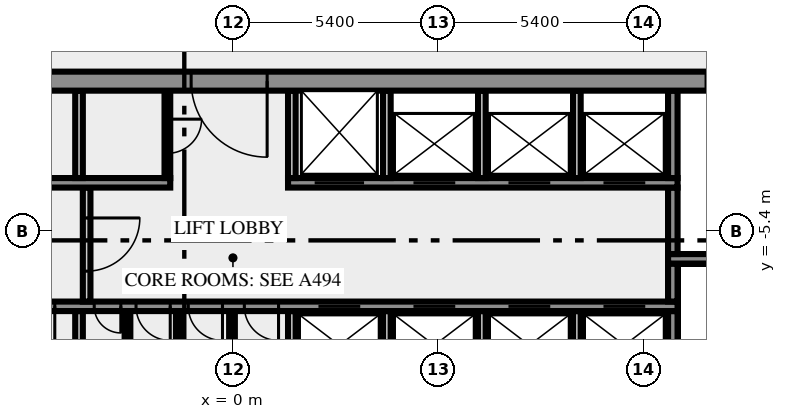
"""IFC4 building model, lengths in metres.
Left out: names, types, materials, properties, quantities, classifications, styles, units other than length and angle.
Written with IfcOpenShell. Run it as: python <this file> out.ifc"""

import sys

from ifc_helpers import new_model, si_unit, direction, frame, frame_2d, origin, place, context, subcontext, project, spatial, rectangle, extrude, element, fill, save


model = new_model("IFC4")
c1 = context("Model", 3, precision=1e-05, world=origin(), true_north=direction((0.0, 1.0)))
c2 = subcontext(c1, "Body", "Model", "MODEL_VIEW")
j1 = project(units=[si_unit("LENGTHUNIT", "METRE"), si_unit("PLANEANGLEUNIT", "RADIAN")], contexts=[c1])
p1 = place(None, origin())
s1 = spatial("IfcSite", under=j1, at=p1, CompositionType="ELEMENT")
p2 = place(p1, origin())
s2 = spatial("IfcBuilding", under=s1, at=p2, CompositionType="ELEMENT")
p3 = place(p2, frame((0.0, 0.0, 210.0)))
s3 = spatial("IfcBuildingStorey", under=s2, at=p3, CompositionType="ELEMENT", Elevation=210.0)
p4 = place(p3, frame((-4.05, -10.5, 0.0), z_axis=(0.0, 0.0, 1.0), x_axis=(0.0, 1.0, 0.0)))
e1 = element("IfcWall", 1, at=p4, inside=s3, PredefinedType="SOLIDWALL", context=c2, shape_type="SweptSolid", body=[
    extrude(rectangle(XDim=3.0, YDim=0.2, at=frame_2d((1.5, 0.0))), origin(), (0.0, 0.0, 1.0), 3.65),
])
for number, where, z_axis, x_axis in (
    (2, (-2.775, -10.5, 0.0), (0.0, 0.0, 1.0), (0.0, 1.0, 0.0)),
    (3, (-1.425, -10.5, 0.0), (0.0, 0.0, 1.0), (0.0, 1.0, 0.0)),
    (4, (-0.025, -10.5, 0.0), (0.0, 0.0, 1.0), (0.0, 1.0, 0.0)),
):
    element("IfcWall", number, at=place(p3, frame(where, z_axis=z_axis, x_axis=x_axis)), inside=s3, PredefinedType="PARTITIONING", context=c2, shape_type="SweptSolid", body=[
        extrude(rectangle(XDim=3.0, YDim=0.15, at=frame_2d((1.5, 0.0))), origin(), (0.0, 0.0, 1.0), 3.65),
    ])
for number, where, z_axis, x_axis in (
    (5, (1.55, -10.5, 0.0), (0.0, 0.0, 1.0), (0.0, 1.0, 0.0)),
    (6, (4.05, -10.5, 0.0), (0.0, 0.0, 1.0), (0.0, 1.0, 0.0)),
    (7, (6.55, -10.5, 0.0), (0.0, 0.0, 1.0), (0.0, 1.0, 0.0)),
    (8, (9.05, -10.5, 0.0), (0.0, 0.0, 1.0), (0.0, 1.0, 0.0)),
):
    element("IfcWall", number, at=place(p3, frame(where, z_axis=z_axis, x_axis=x_axis)), inside=s3, PredefinedType="SOLIDWALL", context=c2, shape_type="SweptSolid", body=[
        extrude(rectangle(XDim=3.0, YDim=0.2, at=frame_2d((1.5, 0.0))), origin(), (0.0, 0.0, 1.0), 3.65),
    ])
p5 = place(p3, frame((11.575, -10.5, 0.0), z_axis=(0.0, 0.0, 1.0), x_axis=(0.0, 1.0, 0.0)))
e9 = element("IfcWall", 9, at=p5, inside=s3, PredefinedType="SHEAR", context=c2, shape_type="SweptSolid", body=[
    extrude(rectangle(XDim=3.0, YDim=0.25, at=frame_2d((1.5, 0.0))), origin(), (0.0, 0.0, 1.0), 3.65),
])
p6 = place(p3, frame((11.7, -7.375, 0.0), z_axis=(0.0, 0.0, 1.0), x_axis=(-1.0, 0.0, 0.0)))
e10 = element("IfcWall", 10, at=p6, inside=s3, PredefinedType="SHEAR", context=c2, shape_type="SweptSolid", body=[
    extrude(rectangle(XDim=23.4, YDim=0.25, at=frame_2d((11.7, 0.0))), origin(), (0.0, 0.0, 1.0), 3.65),
])
p7 = place(p6, frame((21.312, 0.0, 0.0)))
e11 = element("IfcOpeningElement", 11, at=p7, cuts=e10, PredefinedType="OPENING", context=c2, shape_type="SweptSolid", body=[
    extrude(rectangle(XDim=0.9, YDim=2.1, at=frame_2d((0.45, 1.05))), frame((0.0, 0.135, 0.0), z_axis=(0.0, -1.0, 0.0), x_axis=(1.0, 0.0, 0.0)), (0.0, 0.0, 1.0), 0.27),
])
p8 = place(p6, frame((18.65, 0.0, 0.0)))
e12 = element("IfcOpeningElement", 12, at=p8, cuts=e10, PredefinedType="OPENING", context=c2, shape_type="SweptSolid", body=[
    extrude(rectangle(XDim=0.9, YDim=2.1, at=frame_2d((0.45, 1.05))), frame((0.0, 0.135, 0.0), z_axis=(0.0, -1.0, 0.0), x_axis=(1.0, 0.0, 0.0)), (0.0, 0.0, 1.0), 0.27),
])
p9 = place(p6, frame((16.388, 0.0, 0.0)))
e13 = element("IfcOpeningElement", 13, at=p9, cuts=e10, PredefinedType="OPENING", context=c2, shape_type="SweptSolid", body=[
    extrude(rectangle(XDim=0.9, YDim=2.1, at=frame_2d((0.45, 1.05))), frame((0.0, 0.135, 0.0), z_axis=(0.0, -1.0, 0.0), x_axis=(1.0, 0.0, 0.0)), (0.0, 0.0, 1.0), 0.27),
])
p10 = place(p6, frame((14.65, 0.0, 0.0)))
e14 = element("IfcOpeningElement", 14, at=p10, cuts=e10, PredefinedType="OPENING", context=c2, shape_type="SweptSolid", body=[
    extrude(rectangle(XDim=0.7, YDim=2.1, at=frame_2d((0.35, 1.05))), frame((0.0, 0.135, 0.0), z_axis=(0.0, -1.0, 0.0), x_axis=(1.0, 0.0, 0.0)), (0.0, 0.0, 1.0), 0.27),
])
p11 = place(p6, frame((13.35, 0.0, 0.0)))
e15 = element("IfcOpeningElement", 15, at=p11, cuts=e10, PredefinedType="OPENING", context=c2, shape_type="SweptSolid", body=[
    extrude(rectangle(XDim=0.9, YDim=2.1, at=frame_2d((0.45, 1.05))), frame((0.0, 0.135, 0.0), z_axis=(0.0, -1.0, 0.0), x_axis=(1.0, 0.0, 0.0)), (0.0, 0.0, 1.0), 0.27),
])
p12 = place(p6, frame((11.975, 0.0, 0.0)))
e16 = element("IfcOpeningElement", 16, at=p12, cuts=e10, PredefinedType="OPENING", context=c2, shape_type="SweptSolid", body=[
    extrude(rectangle(XDim=0.9, YDim=2.1, at=frame_2d((0.45, 1.05))), frame((0.0, 0.135, 0.0), z_axis=(0.0, -1.0, 0.0), x_axis=(1.0, 0.0, 0.0)), (0.0, 0.0, 1.0), 0.27),
])
p13 = place(p6, frame((10.5, 0.0, 0.0)))
e17 = element("IfcOpeningElement", 17, at=p13, cuts=e10, PredefinedType="OPENING", context=c2, shape_type="SweptSolid", body=[
    extrude(rectangle(XDim=0.9, YDim=2.1, at=frame_2d((0.45, 1.05))), frame((0.0, 0.135, 0.0), z_axis=(0.0, -1.0, 0.0), x_axis=(1.0, 0.0, 0.0)), (0.0, 0.0, 1.0), 0.27),
])
p14 = place(p6, frame((8.35, 0.0, 0.0)))
e18 = element("IfcOpeningElement", 18, at=p14, cuts=e10, PredefinedType="OPENING", context=c2, shape_type="SweptSolid", body=[
    extrude(rectangle(XDim=1.1, YDim=2.1, at=frame_2d((0.55, 1.05))), frame((0.0, 0.135, 0.0), z_axis=(0.0, -1.0, 0.0), x_axis=(1.0, 0.0, 0.0)), (0.0, 0.0, 1.0), 0.27),
])
p15 = place(p6, frame((5.85, 0.0, 0.0)))
e19 = element("IfcOpeningElement", 19, at=p15, cuts=e10, PredefinedType="OPENING", context=c2, shape_type="SweptSolid", body=[
    extrude(rectangle(XDim=1.1, YDim=2.1, at=frame_2d((0.55, 1.05))), frame((0.0, 0.135, 0.0), z_axis=(0.0, -1.0, 0.0), x_axis=(1.0, 0.0, 0.0)), (0.0, 0.0, 1.0), 0.27),
])
p16 = place(p6, frame((3.35, 0.0, 0.0)))
e20 = element("IfcOpeningElement", 20, at=p16, cuts=e10, PredefinedType="OPENING", context=c2, shape_type="SweptSolid", body=[
    extrude(rectangle(XDim=1.1, YDim=2.1, at=frame_2d((0.55, 1.05))), frame((0.0, 0.135, 0.0), z_axis=(0.0, -1.0, 0.0), x_axis=(1.0, 0.0, 0.0)), (0.0, 0.0, 1.0), 0.27),
])
p17 = place(p6, frame((0.85, 0.0, 0.0)))
e21 = element("IfcOpeningElement", 21, at=p17, cuts=e10, PredefinedType="OPENING", context=c2, shape_type="SweptSolid", body=[
    extrude(rectangle(XDim=1.1, YDim=2.1, at=frame_2d((0.55, 1.05))), frame((0.0, 0.135, 0.0), z_axis=(0.0, -1.0, 0.0), x_axis=(1.0, 0.0, 0.0)), (0.0, 0.0, 1.0), 0.27),
])
p18 = place(p3, frame((-3.85, -4.25, 0.0), z_axis=(0.0, 0.0, 1.0), x_axis=(0.0, -1.0, 0.0)))
e22 = element("IfcWall", 22, at=p18, inside=s3, PredefinedType="SOLIDWALL", context=c2, shape_type="SweptSolid", body=[
    extrude(rectangle(XDim=3.0, YDim=0.2, at=frame_2d((1.5, 0.0))), origin(), (0.0, 0.0, 1.0), 3.65),
])
p19 = place(p18, frame((0.8, 0.0, 0.0)))
e23 = element("IfcOpeningElement", 23, at=p19, cuts=e22, PredefinedType="OPENING", context=c2, shape_type="SweptSolid", body=[
    extrude(rectangle(XDim=1.4, YDim=2.1, at=frame_2d((0.7, 1.05))), frame((0.0, 0.11, 0.0), z_axis=(0.0, -1.0, 0.0), x_axis=(1.0, 0.0, 0.0)), (0.0, 0.0, 1.0), 0.22),
])
p20 = place(p3, frame((11.575, -7.25, 0.0), z_axis=(0.0, 0.0, 1.0), x_axis=(0.0, 1.0, 0.0)))
e24 = element("IfcWall", 24, at=p20, inside=s3, PredefinedType="SHEAR", context=c2, shape_type="SweptSolid", body=[
    extrude(rectangle(XDim=1.0, YDim=0.25, at=frame_2d((0.5, 0.0))), origin(), (0.0, 0.0, 1.0), 3.65),
])
p21 = place(p3, frame((19.5, -6.125, 0.0), z_axis=(0.0, 0.0, 1.0), x_axis=(-1.0, 0.0, 0.0)))
e25 = element("IfcWall", 25, at=p21, inside=s3, PredefinedType="SHEAR", context=c2, shape_type="SweptSolid", body=[
    extrude(rectangle(XDim=8.05, YDim=0.25, at=frame_2d((4.025, 0.0))), origin(), (0.0, 0.0, 1.0), 3.65),
])
p22 = place(p21, frame((0.05, 0.0, 0.0)))
e26 = element("IfcOpeningElement", 26, at=p22, cuts=e25, PredefinedType="OPENING", context=c2, shape_type="SweptSolid", body=[
    extrude(rectangle(XDim=1.8, YDim=2.1, at=frame_2d((0.9, 1.05))), frame((0.0, 0.135, 0.0), z_axis=(0.0, -1.0, 0.0), x_axis=(1.0, 0.0, 0.0)), (0.0, 0.0, 1.0), 0.27),
])
p23 = place(p3, frame((11.575, -6.0, 0.0), z_axis=(0.0, 0.0, 1.0), x_axis=(0.0, 1.0, 0.0)))
e27 = element("IfcWall", 27, at=p23, inside=s3, PredefinedType="SHEAR", context=c2, shape_type="SweptSolid", body=[
    extrude(rectangle(XDim=1.75, YDim=0.25, at=frame_2d((0.875, 0.0))), origin(), (0.0, 0.0, 1.0), 3.65),
])
p24 = place(p3, frame((-11.7, -4.125, 0.0), z_axis=(0.0, 0.0, 1.0), x_axis=(1.0, 0.0, 0.0)))
e28 = element("IfcWall", 28, at=p24, inside=s3, PredefinedType="SHEAR", context=c2, shape_type="SweptSolid", body=[
    extrude(rectangle(XDim=10.05, YDim=0.25, at=frame_2d((5.025, 0.0))), origin(), (0.0, 0.0, 1.0), 3.65),
])
p25 = place(p3, frame((1.45, -4.125, 0.0), z_axis=(0.0, 0.0, 1.0), x_axis=(1.0, 0.0, 0.0)))
e29 = element("IfcWall", 29, at=p25, inside=s3, PredefinedType="SHEAR", context=c2, shape_type="SweptSolid", body=[
    extrude(rectangle(XDim=10.25, YDim=0.25, at=frame_2d((5.125, 0.0))), origin(), (0.0, 0.0, 1.0), 3.65),
])
p26 = place(p25, frame((0.7, 0.0, 0.0)))
e30 = element("IfcOpeningElement", 30, at=p26, cuts=e29, PredefinedType="OPENING", context=c2, shape_type="SweptSolid", body=[
    extrude(rectangle(XDim=1.3, YDim=2.1, at=frame_2d((0.65, 1.05))), frame((0.0, 0.135, 0.0), z_axis=(0.0, -1.0, 0.0), x_axis=(1.0, 0.0, 0.0)), (0.0, 0.0, 1.0), 0.27),
])
p27 = place(p25, frame((3.3, 0.0, 0.0)))
e31 = element("IfcOpeningElement", 31, at=p27, cuts=e29, PredefinedType="OPENING", context=c2, shape_type="SweptSolid", body=[
    extrude(rectangle(XDim=1.1, YDim=2.1, at=frame_2d((0.55, 1.05))), frame((0.0, 0.135, 0.0), z_axis=(0.0, -1.0, 0.0), x_axis=(1.0, 0.0, 0.0)), (0.0, 0.0, 1.0), 0.27),
])
p28 = place(p25, frame((5.8, 0.0, 0.0)))
e32 = element("IfcOpeningElement", 32, at=p28, cuts=e29, PredefinedType="OPENING", context=c2, shape_type="SweptSolid", body=[
    extrude(rectangle(XDim=1.1, YDim=2.1, at=frame_2d((0.55, 1.05))), frame((0.0, 0.135, 0.0), z_axis=(0.0, -1.0, 0.0), x_axis=(1.0, 0.0, 0.0)), (0.0, 0.0, 1.0), 0.27),
])
p29 = place(p25, frame((8.3, 0.0, 0.0)))
e33 = element("IfcOpeningElement", 33, at=p29, cuts=e29, PredefinedType="OPENING", context=c2, shape_type="SweptSolid", body=[
    extrude(rectangle(XDim=1.1, YDim=2.1, at=frame_2d((0.55, 1.05))), frame((0.0, 0.135, 0.0), z_axis=(0.0, -1.0, 0.0), x_axis=(1.0, 0.0, 0.0)), (0.0, 0.0, 1.0), 0.27),
])
p30 = place(p3, frame((-4.05, -4.0, 0.0), z_axis=(0.0, 0.0, 1.0), x_axis=(0.0, 1.0, 0.0)))
e34 = element("IfcWall", 34, at=p30, inside=s3, PredefinedType="SOLIDWALL", context=c2, shape_type="SweptSolid", body=[
    extrude(rectangle(XDim=2.3, YDim=0.2, at=frame_2d((1.15, 0.0))), origin(), (0.0, 0.0, 1.0), 3.65),
])
p31 = place(p3, frame((-1.725, -1.7, 0.0), z_axis=(0.0, 0.0, 1.0), x_axis=(0.0, -1.0, 0.0)))
e35 = element("IfcWall", 35, at=p31, inside=s3, PredefinedType="PARTITIONING", context=c2, shape_type="SweptSolid", body=[
    extrude(rectangle(XDim=2.3, YDim=0.15, at=frame_2d((1.15, 0.0))), origin(), (0.0, 0.0, 1.0), 3.65),
])
p32 = place(p31, frame((0.75, 0.0, 0.0)))
e36 = element("IfcOpeningElement", 36, at=p32, cuts=e35, PredefinedType="OPENING", context=c2, shape_type="SweptSolid", body=[
    extrude(rectangle(XDim=0.9, YDim=2.1, at=frame_2d((0.45, 1.05))), frame((0.0, 0.085, 0.0), z_axis=(0.0, -1.0, 0.0), x_axis=(1.0, 0.0, 0.0)), (0.0, 0.0, 1.0), 0.17),
])
for number, where, z_axis, x_axis in (
    (37, (1.55, -4.0, 0.0), (0.0, 0.0, 1.0), (0.0, 1.0, 0.0)),
    (38, (4.05, -4.0, 0.0), (0.0, 0.0, 1.0), (0.0, 1.0, 0.0)),
    (39, (6.55, -4.0, 0.0), (0.0, 0.0, 1.0), (0.0, 1.0, 0.0)),
    (40, (9.05, -4.0, 0.0), (0.0, 0.0, 1.0), (0.0, 1.0, 0.0)),
):
    element("IfcWall", number, at=place(p3, frame(where, z_axis=z_axis, x_axis=x_axis)), inside=s3, PredefinedType="SOLIDWALL", context=c2, shape_type="SweptSolid", body=[
        extrude(rectangle(XDim=2.3, YDim=0.2, at=frame_2d((1.15, 0.0))), origin(), (0.0, 0.0, 1.0), 3.65),
    ])
p33 = place(p3, frame((11.575, -4.0, 0.0), z_axis=(0.0, 0.0, 1.0), x_axis=(0.0, 1.0, 0.0)))
e41 = element("IfcWall", 41, at=p33, inside=s3, PredefinedType="SHEAR", context=c2, shape_type="SweptSolid", body=[
    extrude(rectangle(XDim=2.3, YDim=0.25, at=frame_2d((1.15, 0.0))), origin(), (0.0, 0.0, 1.0), 3.65),
])
p34 = place(p3, frame((20.49, -1.45, 0.0), z_axis=(0.0, 0.0, 1.0), x_axis=(-1.0, 0.0, 0.0)))
e42 = element("IfcWall", 42, at=p34, inside=s3, PredefinedType="SHEAR", context=c2, shape_type="SweptSolid", body=[
    extrude(rectangle(XDim=40.98, YDim=0.5, at=frame_2d((20.49, 0.0))), origin(), (0.0, 0.0, 1.0), 3.65),
])
p35 = place(p34, frame((38.14, 0.0, 0.0)))
e43 = element("IfcOpeningElement", 43, at=p35, cuts=e42, PredefinedType="OPENING", context=c2, shape_type="SweptSolid", body=[
    extrude(rectangle(XDim=1.8, YDim=2.1, at=frame_2d((0.9, 1.05))), frame((0.0, 0.26, 0.0), z_axis=(0.0, -1.0, 0.0), x_axis=(1.0, 0.0, 0.0)), (0.0, 0.0, 1.0), 0.52),
])
p36 = place(p34, frame((36.728, 0.0, 0.0)))
e44 = element("IfcOpeningElement", 44, at=p36, cuts=e42, PredefinedType="OPENING", context=c2, shape_type="SweptSolid", body=[
    extrude(rectangle(XDim=0.8, YDim=2.1, at=frame_2d((0.4, 1.05))), frame((0.0, 0.26, 0.0), z_axis=(0.0, -1.0, 0.0), x_axis=(1.0, 0.0, 0.0)), (0.0, 0.0, 1.0), 0.52),
])
p37 = place(p34, frame((35.153, 0.0, 0.0)))
e45 = element("IfcOpeningElement", 45, at=p37, cuts=e42, PredefinedType="OPENING", context=c2, shape_type="SweptSolid", body=[
    extrude(rectangle(XDim=0.8, YDim=2.1, at=frame_2d((0.4, 1.05))), frame((0.0, 0.26, 0.0), z_axis=(0.0, -1.0, 0.0), x_axis=(1.0, 0.0, 0.0)), (0.0, 0.0, 1.0), 0.52),
])
p38 = place(p34, frame((32.94, 0.0, 0.0)))
e46 = element("IfcOpeningElement", 46, at=p38, cuts=e42, PredefinedType="OPENING", context=c2, shape_type="SweptSolid", body=[
    extrude(rectangle(XDim=0.9, YDim=2.1, at=frame_2d((0.45, 1.05))), frame((0.0, 0.26, 0.0), z_axis=(0.0, -1.0, 0.0), x_axis=(1.0, 0.0, 0.0)), (0.0, 0.0, 1.0), 0.52),
])
p39 = place(p34, frame((30.702, 0.0, 0.0)))
e47 = element("IfcOpeningElement", 47, at=p39, cuts=e42, PredefinedType="OPENING", context=c2, shape_type="SweptSolid", body=[
    extrude(rectangle(XDim=0.9, YDim=2.1, at=frame_2d((0.45, 1.05))), frame((0.0, 0.26, 0.0), z_axis=(0.0, -1.0, 0.0), x_axis=(1.0, 0.0, 0.0)), (0.0, 0.0, 1.0), 0.52),
])
p40 = place(p34, frame((28.64, 0.0, 0.0)))
e48 = element("IfcOpeningElement", 48, at=p40, cuts=e42, PredefinedType="OPENING", context=c2, shape_type="SweptSolid", body=[
    extrude(rectangle(XDim=0.9, YDim=2.1, at=frame_2d((0.45, 1.05))), frame((0.0, 0.26, 0.0), z_axis=(0.0, -1.0, 0.0), x_axis=(1.0, 0.0, 0.0)), (0.0, 0.0, 1.0), 0.52),
])
p41 = place(p34, frame((25.778, 0.0, 0.0)))
e49 = element("IfcOpeningElement", 49, at=p41, cuts=e42, PredefinedType="OPENING", context=c2, shape_type="SweptSolid", body=[
    extrude(rectangle(XDim=0.9, YDim=2.1, at=frame_2d((0.45, 1.05))), frame((0.0, 0.26, 0.0), z_axis=(0.0, -1.0, 0.0), x_axis=(1.0, 0.0, 0.0)), (0.0, 0.0, 1.0), 0.52),
])
p42 = place(p34, frame((19.59, 0.0, 0.0)))
e50 = element("IfcOpeningElement", 50, at=p42, cuts=e42, PredefinedType="OPENING", context=c2, shape_type="SweptSolid", body=[
    extrude(rectangle(XDim=2.0, YDim=2.1, at=frame_2d((1.0, 1.05))), frame((0.0, 0.26, 0.0), z_axis=(0.0, -1.0, 0.0), x_axis=(1.0, 0.0, 0.0)), (0.0, 0.0, 1.0), 0.52),
])
p43 = place(p34, frame((7.14, 0.0, 0.0)))
e51 = element("IfcOpeningElement", 51, at=p43, cuts=e42, PredefinedType="OPENING", context=c2, shape_type="SweptSolid", body=[
    extrude(rectangle(XDim=0.9, YDim=2.1, at=frame_2d((0.45, 1.05))), frame((0.0, 0.26, 0.0), z_axis=(0.0, -1.0, 0.0), x_axis=(1.0, 0.0, 0.0)), (0.0, 0.0, 1.0), 0.52),
])
p44 = place(p34, frame((4.19, 0.0, 0.0)))
e52 = element("IfcOpeningElement", 52, at=p44, cuts=e42, PredefinedType="OPENING", context=c2, shape_type="SweptSolid", body=[
    extrude(rectangle(XDim=0.9, YDim=2.1, at=frame_2d((0.45, 1.05))), frame((0.0, 0.26, 0.0), z_axis=(0.0, -1.0, 0.0), x_axis=(1.0, 0.0, 0.0)), (0.0, 0.0, 1.0), 0.52),
])
p45 = place(p34, frame((1.04, 0.0, 0.0)))
e53 = element("IfcOpeningElement", 53, at=p45, cuts=e42, PredefinedType="OPENING", context=c2, shape_type="SweptSolid", body=[
    extrude(rectangle(XDim=1.8, YDim=2.1, at=frame_2d((0.9, 1.05))), frame((0.0, 0.26, 0.0), z_axis=(0.0, -1.0, 0.0), x_axis=(1.0, 0.0, 0.0)), (0.0, 0.0, 1.0), 0.52),
])
p46 = place(p9, origin())
e54 = element("IfcDoor", 54, at=p46, inside=s3, OperationType="SINGLE_SWING_RIGHT", PredefinedType="DOOR", context=c2, shape_type="SweptSolid", body=[
    extrude(rectangle(XDim=0.9, YDim=2.1, at=frame_2d((0.45, 1.05))), frame((0.0, 0.025, 0.0), z_axis=(0.0, -1.0, 0.0), x_axis=(1.0, 0.0, 0.0)), (0.0, 0.0, 1.0), 0.05),
])
fill(e13, e54)
p47 = place(p10, origin())
e55 = element("IfcDoor", 55, at=p47, inside=s3, OperationType="SINGLE_SWING_RIGHT", PredefinedType="DOOR", context=c2, shape_type="SweptSolid", body=[
    extrude(rectangle(XDim=0.7, YDim=2.1, at=frame_2d((0.35, 1.05))), frame((0.0, 0.025, 0.0), z_axis=(0.0, -1.0, 0.0), x_axis=(1.0, 0.0, 0.0)), (0.0, 0.0, 1.0), 0.05),
])
fill(e14, e55)
p48 = place(p11, origin())
e56 = element("IfcDoor", 56, at=p48, inside=s3, OperationType="SINGLE_SWING_RIGHT", PredefinedType="DOOR", context=c2, shape_type="SweptSolid", body=[
    extrude(rectangle(XDim=0.9, YDim=2.1, at=frame_2d((0.45, 1.05))), frame((0.0, 0.025, 0.0), z_axis=(0.0, -1.0, 0.0), x_axis=(1.0, 0.0, 0.0)), (0.0, 0.0, 1.0), 0.05),
])
fill(e15, e56)
p49 = place(p12, origin())
e57 = element("IfcDoor", 57, at=p49, inside=s3, OperationType="SINGLE_SWING_RIGHT", PredefinedType="DOOR", context=c2, shape_type="SweptSolid", body=[
    extrude(rectangle(XDim=0.9, YDim=2.1, at=frame_2d((0.45, 1.05))), frame((0.0, 0.025, 0.0), z_axis=(0.0, -1.0, 0.0), x_axis=(1.0, 0.0, 0.0)), (0.0, 0.0, 1.0), 0.05),
])
fill(e16, e57)
p50 = place(p13, origin())
e58 = element("IfcDoor", 58, at=p50, inside=s3, OperationType="SINGLE_SWING_LEFT", PredefinedType="DOOR", context=c2, shape_type="SweptSolid", body=[
    extrude(rectangle(XDim=0.9, YDim=2.1, at=frame_2d((0.45, 1.05))), frame((0.0, 0.025, 0.0), z_axis=(0.0, -1.0, 0.0), x_axis=(1.0, 0.0, 0.0)), (0.0, 0.0, 1.0), 0.05),
])
fill(e17, e58)
p51 = place(p14, origin())
e59 = element("IfcDoor", 59, at=p51, inside=s3, OperationType="DOUBLE_DOOR_SLIDING", PredefinedType="DOOR", context=c2, shape_type="SweptSolid", body=[
    extrude(rectangle(XDim=1.1, YDim=2.1, at=frame_2d((0.55, 1.05))), frame((0.0, 0.025, 0.0), z_axis=(0.0, -1.0, 0.0), x_axis=(1.0, 0.0, 0.0)), (0.0, 0.0, 1.0), 0.05),
])
fill(e18, e59)
p52 = place(p15, origin())
e60 = element("IfcDoor", 60, at=p52, inside=s3, OperationType="DOUBLE_DOOR_SLIDING", PredefinedType="DOOR", context=c2, shape_type="SweptSolid", body=[
    extrude(rectangle(XDim=1.1, YDim=2.1, at=frame_2d((0.55, 1.05))), frame((0.0, 0.025, 0.0), z_axis=(0.0, -1.0, 0.0), x_axis=(1.0, 0.0, 0.0)), (0.0, 0.0, 1.0), 0.05),
])
fill(e19, e60)
p53 = place(p16, origin())
e61 = element("IfcDoor", 61, at=p53, inside=s3, OperationType="DOUBLE_DOOR_SLIDING", PredefinedType="DOOR", context=c2, shape_type="SweptSolid", body=[
    extrude(rectangle(XDim=1.1, YDim=2.1, at=frame_2d((0.55, 1.05))), frame((0.0, 0.025, 0.0), z_axis=(0.0, -1.0, 0.0), x_axis=(1.0, 0.0, 0.0)), (0.0, 0.0, 1.0), 0.05),
])
fill(e20, e61)
p54 = place(p17, origin())
e62 = element("IfcDoor", 62, at=p54, inside=s3, OperationType="DOUBLE_DOOR_SLIDING", PredefinedType="DOOR", context=c2, shape_type="SweptSolid", body=[
    extrude(rectangle(XDim=1.1, YDim=2.1, at=frame_2d((0.55, 1.05))), frame((0.0, 0.025, 0.0), z_axis=(0.0, -1.0, 0.0), x_axis=(1.0, 0.0, 0.0)), (0.0, 0.0, 1.0), 0.05),
])
fill(e21, e62)
p55 = place(p19, origin())
e63 = element("IfcDoor", 63, at=p55, inside=s3, OperationType="DOUBLE_DOOR_SINGLE_SWING", PredefinedType="DOOR", context=c2, shape_type="SweptSolid", body=[
    extrude(rectangle(XDim=1.4, YDim=2.1, at=frame_2d((0.7, 1.05))), frame((0.0, 0.025, 0.0), z_axis=(0.0, -1.0, 0.0), x_axis=(1.0, 0.0, 0.0)), (0.0, 0.0, 1.0), 0.05),
])
fill(e23, e63)
p56 = place(p26, origin())
e64 = element("IfcDoor", 64, at=p56, inside=s3, OperationType="DOUBLE_DOOR_SLIDING", PredefinedType="DOOR", context=c2, shape_type="SweptSolid", body=[
    extrude(rectangle(XDim=1.3, YDim=2.1, at=frame_2d((0.65, 1.05))), frame((0.0, 0.025, 0.0), z_axis=(0.0, -1.0, 0.0), x_axis=(1.0, 0.0, 0.0)), (0.0, 0.0, 1.0), 0.05),
])
fill(e30, e64)
p57 = place(p27, origin())
e65 = element("IfcDoor", 65, at=p57, inside=s3, OperationType="DOUBLE_DOOR_SLIDING", PredefinedType="DOOR", context=c2, shape_type="SweptSolid", body=[
    extrude(rectangle(XDim=1.1, YDim=2.1, at=frame_2d((0.55, 1.05))), frame((0.0, 0.025, 0.0), z_axis=(0.0, -1.0, 0.0), x_axis=(1.0, 0.0, 0.0)), (0.0, 0.0, 1.0), 0.05),
])
fill(e31, e65)
p58 = place(p28, origin())
e66 = element("IfcDoor", 66, at=p58, inside=s3, OperationType="DOUBLE_DOOR_SLIDING", PredefinedType="DOOR", context=c2, shape_type="SweptSolid", body=[
    extrude(rectangle(XDim=1.1, YDim=2.1, at=frame_2d((0.55, 1.05))), frame((0.0, 0.025, 0.0), z_axis=(0.0, -1.0, 0.0), x_axis=(1.0, 0.0, 0.0)), (0.0, 0.0, 1.0), 0.05),
])
fill(e32, e66)
p59 = place(p29, origin())
e67 = element("IfcDoor", 67, at=p59, inside=s3, OperationType="DOUBLE_DOOR_SLIDING", PredefinedType="DOOR", context=c2, shape_type="SweptSolid", body=[
    extrude(rectangle(XDim=1.1, YDim=2.1, at=frame_2d((0.55, 1.05))), frame((0.0, 0.025, 0.0), z_axis=(0.0, -1.0, 0.0), x_axis=(1.0, 0.0, 0.0)), (0.0, 0.0, 1.0), 0.05),
])
fill(e33, e67)
p60 = place(p32, origin())
e68 = element("IfcDoor", 68, at=p60, inside=s3, OperationType="SINGLE_SWING_RIGHT", PredefinedType="DOOR", context=c2, shape_type="SweptSolid", body=[
    extrude(rectangle(XDim=0.9, YDim=2.1, at=frame_2d((0.45, 1.05))), frame((0.0, 0.025, 0.0), z_axis=(0.0, -1.0, 0.0), x_axis=(1.0, 0.0, 0.0)), (0.0, 0.0, 1.0), 0.05),
])
fill(e36, e68)
p61 = place(p42, origin())
e69 = element("IfcDoor", 69, at=p61, inside=s3, OperationType="DOUBLE_DOOR_SINGLE_SWING", PredefinedType="DOOR", context=c2, shape_type="SweptSolid", body=[
    extrude(rectangle(XDim=2.0, YDim=2.1, at=frame_2d((1.0, 1.05))), frame((0.0, 0.025, 0.0), z_axis=(0.0, -1.0, 0.0), x_axis=(1.0, 0.0, 0.0)), (0.0, 0.0, 1.0), 0.05),
])
fill(e50, e69)
save(model, sys.argv[1])
